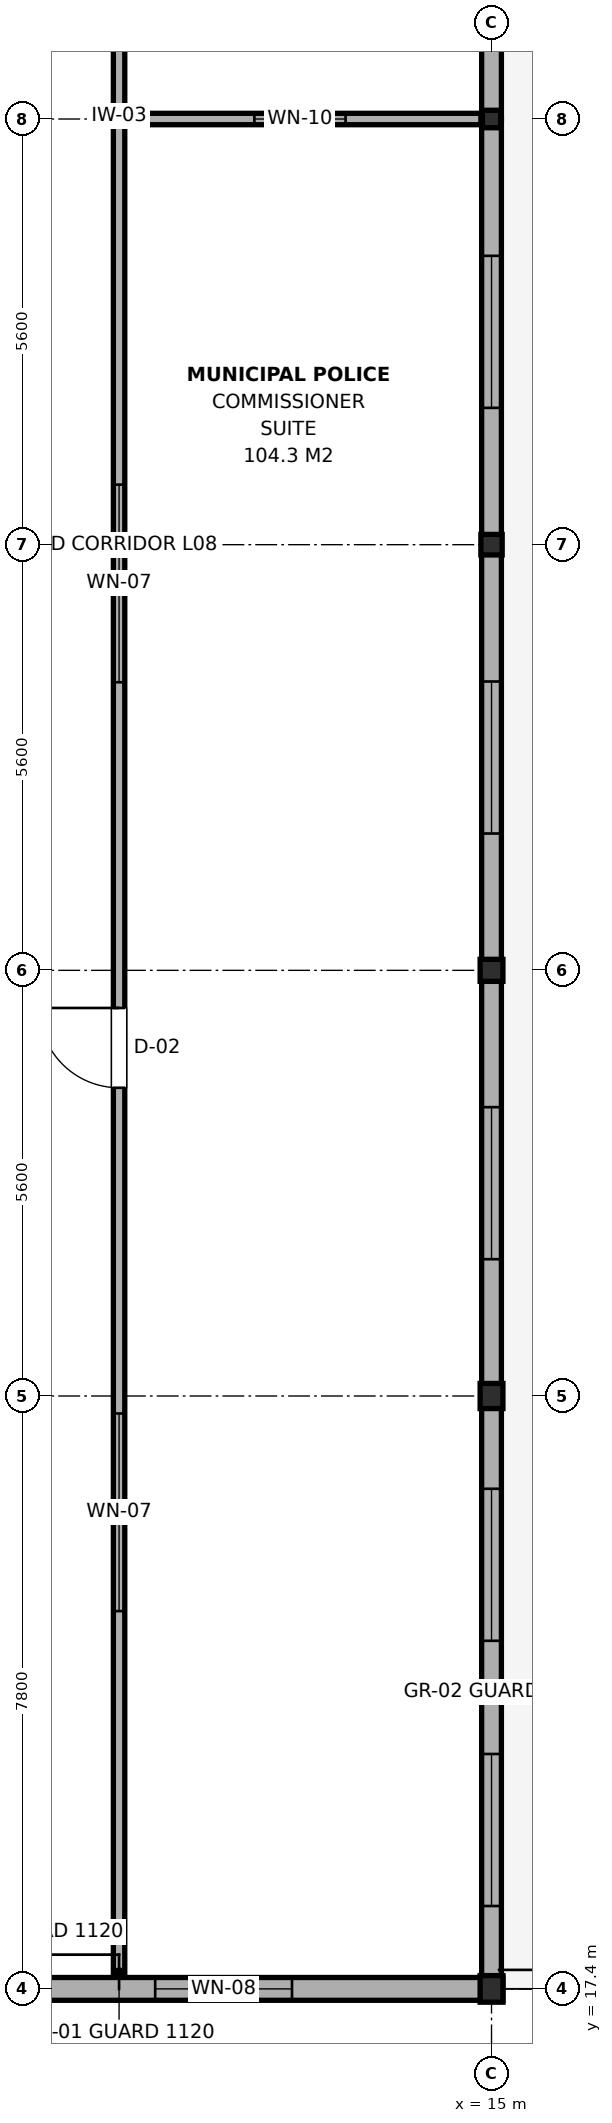
"""IFC4 building model, lengths in metres.
Left out: names, types, materials, properties, quantities, classifications, styles, units other than length and angle.
Written with IfcOpenShell. Run it as: python <this file> out.ifc"""

import sys

from ifc_helpers import new_model, si_unit, direction, frame, frame_2d, origin, origin_2d, place, context, subcontext, project, spatial, rectangle, i_section, extrude, element, fill, save


model = new_model("IFC4")
c1 = context("Model", 3, precision=1e-05, world=origin(), true_north=direction((0.0, 1.0)))
c2 = subcontext(c1, "Body", "Model", "MODEL_VIEW")
j1 = project(units=[si_unit("LENGTHUNIT", "METRE"), si_unit("PLANEANGLEUNIT", "RADIAN")], contexts=[c1])
p1 = place(None, origin())
s1 = spatial("IfcSite", under=j1, at=p1, CompositionType="ELEMENT")
p2 = place(p1, origin())
s2 = spatial("IfcBuilding", under=s1, at=p2, CompositionType="ELEMENT")
p3 = place(p2, frame((0.0, 0.0, 32.7)))
s3 = spatial("IfcBuildingStorey", under=s2, at=p3, CompositionType="ELEMENT", Elevation=32.7)
p4 = place(p3, frame((15.0, 17.4, 0.0), z_axis=(0.0, 0.0, 1.0), x_axis=(1.0, 0.0, 0.0)))
e1 = element("IfcColumn", 1, at=p4, inside=s3, PredefinedType="COLUMN", context=c2, shape_type="SweptSolid", body=[
    extrude(i_section(OverallWidth=0.3, OverallDepth=0.35, WebThickness=0.01, FlangeThickness=0.018, FilletRadius=0.027, at=origin_2d()), origin(), (0.0, 0.0, 1.0), 3.72),
])
p5 = place(p3, frame((15.0, 25.2, 0.0), z_axis=(0.0, 0.0, 1.0), x_axis=(1.0, 0.0, 0.0)))
e2 = element("IfcColumn", 2, at=p5, inside=s3, PredefinedType="COLUMN", context=c2, shape_type="SweptSolid", body=[
    extrude(i_section(OverallWidth=0.3, OverallDepth=0.33, WebThickness=0.01, FlangeThickness=0.017, FilletRadius=0.027, at=origin_2d()), origin(), (0.0, 0.0, 1.0), 3.72),
])
p6 = place(p3, frame((15.0, 30.8, 0.0), z_axis=(0.0, 0.0, 1.0), x_axis=(1.0, 0.0, 0.0)))
e3 = element("IfcColumn", 3, at=p6, inside=s3, PredefinedType="COLUMN", context=c2, shape_type="SweptSolid", body=[
    extrude(i_section(OverallWidth=0.3, OverallDepth=0.29, WebThickness=0.009, FlangeThickness=0.014, FilletRadius=0.027, at=origin_2d()), origin(), (0.0, 0.0, 1.0), 3.72),
])
p7 = place(p3, frame((15.0, 36.4, 0.0), z_axis=(0.0, 0.0, 1.0), x_axis=(1.0, 0.0, 0.0)))
e4 = element("IfcColumn", 4, at=p7, inside=s3, PredefinedType="COLUMN", context=c2, shape_type="SweptSolid", body=[
    extrude(i_section(OverallWidth=0.28, OverallDepth=0.27, WebThickness=0.008, FlangeThickness=0.013, FilletRadius=0.024, at=origin_2d()), origin(), (0.0, 0.0, 1.0), 3.72),
])
p8 = place(p3, frame((15.0, 42.0, 0.0), z_axis=(0.0, 0.0, 1.0), x_axis=(1.0, 0.0, 0.0)))
e5 = element("IfcColumn", 5, at=p8, inside=s3, PredefinedType="COLUMN", context=c2, shape_type="SweptSolid", body=[
    extrude(i_section(OverallWidth=0.24, OverallDepth=0.23, WebThickness=0.008, FlangeThickness=0.012, FilletRadius=0.021, at=origin_2d()), origin(), (0.0, 0.0, 1.0), 3.72),
])
p9 = place(p3, frame((15.0, 17.27, 0.0), z_axis=(0.0, 0.0, 1.0), x_axis=(0.0, 1.0, 0.0)))
e6 = element("IfcWall", 6, at=p9, inside=s3, PredefinedType="SOLIDWALL", context=c2, shape_type="SweptSolid", body=[
    extrude(rectangle(XDim=7.93, YDim=0.26, at=frame_2d((3.965, 0.0))), origin(), (0.0, 0.0, 1.0), 3.115),
])
p10 = place(p9, frame((1.22, 0.0, 0.9)))
e7 = element("IfcOpeningElement", 7, at=p10, cuts=e6, PredefinedType="OPENING", context=c2, shape_type="SweptSolid", body=[
    extrude(rectangle(XDim=2.0, YDim=1.8, at=frame_2d((1.0, 0.9))), frame((0.0, 0.145, 0.0), z_axis=(0.0, -1.0, 0.0), x_axis=(1.0, 0.0, 0.0)), (0.0, 0.0, 1.0), 0.29),
])
p11 = place(p9, frame((4.71, 0.0, 0.9)))
e8 = element("IfcOpeningElement", 8, at=p11, cuts=e6, PredefinedType="OPENING", context=c2, shape_type="SweptSolid", body=[
    extrude(rectangle(XDim=2.0, YDim=1.8, at=frame_2d((1.0, 0.9))), frame((0.0, 0.145, 0.0), z_axis=(0.0, -1.0, 0.0), x_axis=(1.0, 0.0, 0.0)), (0.0, 0.0, 1.0), 0.29),
])
p12 = place(p3, frame((15.0, 25.2, 0.0), z_axis=(0.0, 0.0, 1.0), x_axis=(0.0, 1.0, 0.0)))
e9 = element("IfcWall", 9, at=p12, inside=s3, PredefinedType="SOLIDWALL", context=c2, shape_type="SweptSolid", body=[
    extrude(rectangle(XDim=5.6, YDim=0.26, at=frame_2d((2.8, 0.0))), origin(), (0.0, 0.0, 1.0), 3.115),
])
p13 = place(p12, frame((1.8, 0.0, 0.9)))
e10 = element("IfcOpeningElement", 10, at=p13, cuts=e9, PredefinedType="OPENING", context=c2, shape_type="SweptSolid", body=[
    extrude(rectangle(XDim=2.0, YDim=1.8, at=frame_2d((1.0, 0.9))), frame((0.0, 0.145, 0.0), z_axis=(0.0, -1.0, 0.0), x_axis=(1.0, 0.0, 0.0)), (0.0, 0.0, 1.0), 0.29),
])
p14 = place(p3, frame((15.0, 30.8, 0.0), z_axis=(0.0, 0.0, 1.0), x_axis=(0.0, 1.0, 0.0)))
e11 = element("IfcWall", 11, at=p14, inside=s3, PredefinedType="SOLIDWALL", context=c2, shape_type="SweptSolid", body=[
    extrude(rectangle(XDim=5.6, YDim=0.26, at=frame_2d((2.8, 0.0))), origin(), (0.0, 0.0, 1.0), 3.165),
])
p15 = place(p14, frame((1.8, 0.0, 0.9)))
e12 = element("IfcOpeningElement", 12, at=p15, cuts=e11, PredefinedType="OPENING", context=c2, shape_type="SweptSolid", body=[
    extrude(rectangle(XDim=2.0, YDim=1.8, at=frame_2d((1.0, 0.9))), frame((0.0, 0.145, 0.0), z_axis=(0.0, -1.0, 0.0), x_axis=(1.0, 0.0, 0.0)), (0.0, 0.0, 1.0), 0.29),
])
p16 = place(p3, frame((15.0, 36.4, 0.0), z_axis=(0.0, 0.0, 1.0), x_axis=(0.0, 1.0, 0.0)))
e13 = element("IfcWall", 13, at=p16, inside=s3, PredefinedType="SOLIDWALL", context=c2, shape_type="SweptSolid", body=[
    extrude(rectangle(XDim=5.6, YDim=0.26, at=frame_2d((2.8, 0.0))), origin(), (0.0, 0.0, 1.0), 3.215),
])
p17 = place(p16, frame((1.8, 0.0, 0.9)))
e14 = element("IfcOpeningElement", 14, at=p17, cuts=e13, PredefinedType="OPENING", context=c2, shape_type="SweptSolid", body=[
    extrude(rectangle(XDim=2.0, YDim=1.8, at=frame_2d((1.0, 0.9))), frame((0.0, 0.145, 0.0), z_axis=(0.0, -1.0, 0.0), x_axis=(1.0, 0.0, 0.0)), (0.0, 0.0, 1.0), 0.29),
])
p18 = place(p3, frame((15.0, 42.0, 0.0), z_axis=(0.0, 0.0, 1.0), x_axis=(0.0, 1.0, 0.0)))
e15 = element("IfcWall", 15, at=p18, inside=s3, PredefinedType="SOLIDWALL", context=c2, shape_type="SweptSolid", body=[
    extrude(rectangle(XDim=5.6, YDim=0.26, at=frame_2d((2.8, 0.0))), origin(), (0.0, 0.0, 1.0), 3.265),
])
p19 = place(p18, frame((1.8, 0.0, 0.9)))
e16 = element("IfcOpeningElement", 16, at=p19, cuts=e15, PredefinedType="OPENING", context=c2, shape_type="SweptSolid", body=[
    extrude(rectangle(XDim=2.0, YDim=1.8, at=frame_2d((1.0, 0.9))), frame((0.0, 0.145, 0.0), z_axis=(0.0, -1.0, 0.0), x_axis=(1.0, 0.0, 0.0)), (0.0, 0.0, 1.0), 0.29),
])
p20 = place(p3, frame((7.8, 17.4, 0.0), z_axis=(0.0, 0.0, 1.0), x_axis=(1.0, 0.0, 0.0)))
e17 = element("IfcWall", 17, at=p20, inside=s3, PredefinedType="SOLIDWALL", context=c2, shape_type="SweptSolid", body=[
    extrude(rectangle(XDim=7.35, YDim=0.3, at=frame_2d((3.675, 0.0))), origin(), (0.0, 0.0, 1.0), 3.165),
])
p21 = place(p20, frame((2.775, 0.0, 0.65)))
e18 = element("IfcOpeningElement", 18, at=p21, cuts=e17, PredefinedType="OPENING", context=c2, shape_type="SweptSolid", body=[
    extrude(rectangle(XDim=1.8, YDim=1.2, at=frame_2d((0.9, 0.6))), frame((0.0, 0.165, 0.0), z_axis=(0.0, -1.0, 0.0), x_axis=(1.0, 0.0, 0.0)), (0.0, 0.0, 1.0), 0.33),
])
p22 = place(p3, frame((10.1, 17.56, 0.0), z_axis=(0.0, 0.0, 1.0), x_axis=(0.0, 1.0, 0.0)))
e19 = element("IfcWall", 19, at=p22, inside=s3, PredefinedType="PARTITIONING", context=c2, shape_type="SweptSolid", body=[
    extrude(rectangle(XDim=24.44, YDim=0.15, at=frame_2d((12.22, 0.0))), origin(), (0.0, 0.0, 1.0), 3.165),
])
p23 = place(p22, frame((11.695, 0.0, 0.0)))
e20 = element("IfcOpeningElement", 20, at=p23, cuts=e19, PredefinedType="OPENING", context=c2, shape_type="SweptSolid", body=[
    extrude(rectangle(XDim=1.05, YDim=2.15, at=frame_2d((0.525, 1.075))), frame((0.0, 0.09, 0.0), z_axis=(0.0, -1.0, 0.0), x_axis=(1.0, 0.0, 0.0)), (0.0, 0.0, 1.0), 0.18),
])
p24 = place(p22, frame((4.81, 0.0, 0.95)))
e21 = element("IfcOpeningElement", 21, at=p24, cuts=e19, PredefinedType="OPENING", context=c2, shape_type="SweptSolid", body=[
    extrude(rectangle(XDim=2.6, YDim=1.5, at=frame_2d((1.3, 0.75))), frame((0.0, 0.09, 0.0), z_axis=(0.0, -1.0, 0.0), x_axis=(1.0, 0.0, 0.0)), (0.0, 0.0, 1.0), 0.18),
])
p25 = place(p22, frame((17.03, 0.0, 0.95)))
e22 = element("IfcOpeningElement", 22, at=p25, cuts=e19, PredefinedType="OPENING", context=c2, shape_type="SweptSolid", body=[
    extrude(rectangle(XDim=2.6, YDim=1.5, at=frame_2d((1.3, 0.75))), frame((0.0, 0.09, 0.0), z_axis=(0.0, -1.0, 0.0), x_axis=(1.0, 0.0, 0.0)), (0.0, 0.0, 1.0), 0.18),
])
p26 = place(p3, frame((10.1, 42.0, 0.0), z_axis=(0.0, 0.0, 1.0), x_axis=(0.0, 1.0, 0.0)))
e23 = element("IfcWall", 23, at=p26, inside=s3, PredefinedType="PARTITIONING", context=c2, shape_type="SweptSolid", body=[
    extrude(rectangle(XDim=24.6, YDim=0.15, at=frame_2d((12.3, 0.0))), origin(), (0.0, 0.0, 1.0), 3.165),
])
p27 = place(p26, frame((11.775, 0.0, 0.0)))
e24 = element("IfcOpeningElement", 24, at=p27, cuts=e23, PredefinedType="OPENING", context=c2, shape_type="SweptSolid", body=[
    extrude(rectangle(XDim=1.05, YDim=2.15, at=frame_2d((0.525, 1.075))), frame((0.0, 0.09, 0.0), z_axis=(0.0, -1.0, 0.0), x_axis=(1.0, 0.0, 0.0)), (0.0, 0.0, 1.0), 0.18),
])
p28 = place(p26, frame((4.85, 0.0, 0.95)))
e25 = element("IfcOpeningElement", 25, at=p28, cuts=e23, PredefinedType="OPENING", context=c2, shape_type="SweptSolid", body=[
    extrude(rectangle(XDim=2.6, YDim=1.5, at=frame_2d((1.3, 0.75))), frame((0.0, 0.09, 0.0), z_axis=(0.0, -1.0, 0.0), x_axis=(1.0, 0.0, 0.0)), (0.0, 0.0, 1.0), 0.18),
])
p29 = place(p26, frame((17.15, 0.0, 0.95)))
e26 = element("IfcOpeningElement", 26, at=p29, cuts=e23, PredefinedType="OPENING", context=c2, shape_type="SweptSolid", body=[
    extrude(rectangle(XDim=2.6, YDim=1.5, at=frame_2d((1.3, 0.75))), frame((0.0, 0.09, 0.0), z_axis=(0.0, -1.0, 0.0), x_axis=(1.0, 0.0, 0.0)), (0.0, 0.0, 1.0), 0.18),
])
p30 = place(p3, frame((10.1, 42.0, 0.0), z_axis=(0.0, 0.0, 1.0), x_axis=(1.0, 0.0, 0.0)))
e27 = element("IfcWall", 27, at=p30, inside=s3, PredefinedType="PARTITIONING", context=c2, shape_type="SweptSolid", body=[
    extrude(rectangle(XDim=4.76, YDim=0.15, at=frame_2d((2.38, 0.0))), origin(), (0.0, 0.0, 1.0), 3.265),
])
p31 = place(p30, frame((1.78, 0.0, 0.95)))
e28 = element("IfcOpeningElement", 28, at=p31, cuts=e27, PredefinedType="OPENING", context=c2, shape_type="SweptSolid", body=[
    extrude(rectangle(XDim=1.2, YDim=1.5, at=frame_2d((0.6, 0.75))), frame((0.0, 0.09, 0.0), z_axis=(0.0, -1.0, 0.0), x_axis=(1.0, 0.0, 0.0)), (0.0, 0.0, 1.0), 0.18),
])
p32 = place(p10, origin())
e29 = element("IfcWindow", 29, at=p32, inside=s3, PartitioningType="SINGLE_PANEL", PredefinedType="WINDOW", context=c2, shape_type="SweptSolid", body=[
    extrude(rectangle(XDim=2.0, YDim=1.8, at=frame_2d((1.0, 0.9))), frame((0.0, 0.03, 0.0), z_axis=(0.0, -1.0, 0.0), x_axis=(1.0, 0.0, 0.0)), (0.0, 0.0, 1.0), 0.06),
])
fill(e7, e29)
p33 = place(p11, origin())
e30 = element("IfcWindow", 30, at=p33, inside=s3, PartitioningType="SINGLE_PANEL", PredefinedType="WINDOW", context=c2, shape_type="SweptSolid", body=[
    extrude(rectangle(XDim=2.0, YDim=1.8, at=frame_2d((1.0, 0.9))), frame((0.0, 0.03, 0.0), z_axis=(0.0, -1.0, 0.0), x_axis=(1.0, 0.0, 0.0)), (0.0, 0.0, 1.0), 0.06),
])
fill(e8, e30)
p34 = place(p13, origin())
e31 = element("IfcWindow", 31, at=p34, inside=s3, PartitioningType="SINGLE_PANEL", PredefinedType="WINDOW", context=c2, shape_type="SweptSolid", body=[
    extrude(rectangle(XDim=2.0, YDim=1.8, at=frame_2d((1.0, 0.9))), frame((0.0, 0.03, 0.0), z_axis=(0.0, -1.0, 0.0), x_axis=(1.0, 0.0, 0.0)), (0.0, 0.0, 1.0), 0.06),
])
fill(e10, e31)
p35 = place(p15, origin())
e32 = element("IfcWindow", 32, at=p35, inside=s3, PartitioningType="SINGLE_PANEL", PredefinedType="WINDOW", context=c2, shape_type="SweptSolid", body=[
    extrude(rectangle(XDim=2.0, YDim=1.8, at=frame_2d((1.0, 0.9))), frame((0.0, 0.03, 0.0), z_axis=(0.0, -1.0, 0.0), x_axis=(1.0, 0.0, 0.0)), (0.0, 0.0, 1.0), 0.06),
])
fill(e12, e32)
p36 = place(p17, origin())
e33 = element("IfcWindow", 33, at=p36, inside=s3, PartitioningType="SINGLE_PANEL", PredefinedType="WINDOW", context=c2, shape_type="SweptSolid", body=[
    extrude(rectangle(XDim=2.0, YDim=1.8, at=frame_2d((1.0, 0.9))), frame((0.0, 0.03, 0.0), z_axis=(0.0, -1.0, 0.0), x_axis=(1.0, 0.0, 0.0)), (0.0, 0.0, 1.0), 0.06),
])
fill(e14, e33)
p37 = place(p21, origin())
e34 = element("IfcWindow", 34, at=p37, inside=s3, PartitioningType="SINGLE_PANEL", PredefinedType="WINDOW", context=c2, shape_type="SweptSolid", body=[
    extrude(rectangle(XDim=1.8, YDim=1.2, at=frame_2d((0.9, 0.6))), frame((0.0, 0.03, 0.0), z_axis=(0.0, -1.0, 0.0), x_axis=(1.0, 0.0, 0.0)), (0.0, 0.0, 1.0), 0.06),
])
fill(e18, e34)
p38 = place(p23, origin())
e35 = element("IfcDoor", 35, at=p38, inside=s3, OperationType="SINGLE_SWING_RIGHT", PredefinedType="DOOR", context=c2, shape_type="SweptSolid", body=[
    extrude(rectangle(XDim=1.05, YDim=2.15, at=frame_2d((0.525, 1.075))), frame((0.0, 0.025, 0.0), z_axis=(0.0, -1.0, 0.0), x_axis=(1.0, 0.0, 0.0)), (0.0, 0.0, 1.0), 0.05),
])
fill(e20, e35)
p39 = place(p24, origin())
e36 = element("IfcWindow", 36, at=p39, inside=s3, PartitioningType="SINGLE_PANEL", PredefinedType="WINDOW", context=c2, shape_type="SweptSolid", body=[
    extrude(rectangle(XDim=2.6, YDim=1.5, at=frame_2d((1.3, 0.75))), frame((0.0, 0.03, 0.0), z_axis=(0.0, -1.0, 0.0), x_axis=(1.0, 0.0, 0.0)), (0.0, 0.0, 1.0), 0.06),
])
fill(e21, e36)
p40 = place(p25, origin())
e37 = element("IfcWindow", 37, at=p40, inside=s3, PartitioningType="SINGLE_PANEL", PredefinedType="WINDOW", context=c2, shape_type="SweptSolid", body=[
    extrude(rectangle(XDim=2.6, YDim=1.5, at=frame_2d((1.3, 0.75))), frame((0.0, 0.03, 0.0), z_axis=(0.0, -1.0, 0.0), x_axis=(1.0, 0.0, 0.0)), (0.0, 0.0, 1.0), 0.06),
])
fill(e22, e37)
p41 = place(p31, origin())
e38 = element("IfcWindow", 38, at=p41, inside=s3, PartitioningType="SINGLE_PANEL", PredefinedType="WINDOW", context=c2, shape_type="SweptSolid", body=[
    extrude(rectangle(XDim=1.2, YDim=1.5, at=frame_2d((0.6, 0.75))), frame((0.0, 0.03, 0.0), z_axis=(0.0, -1.0, 0.0), x_axis=(1.0, 0.0, 0.0)), (0.0, 0.0, 1.0), 0.06),
])
fill(e28, e38)
save(model, sys.argv[1])
